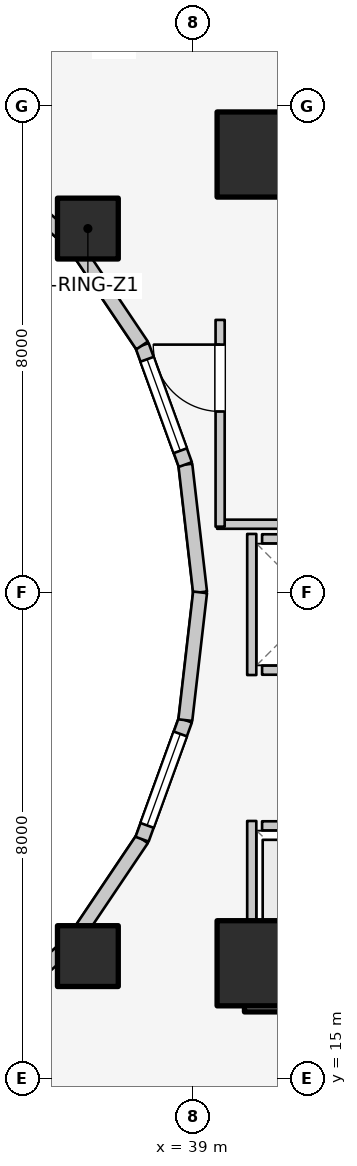
"""IFC4 building model, lengths in metres.
Left out: names, types, materials, properties, quantities, classifications, styles, units other than length and angle.
Written with IfcOpenShell. Run it as: python <this file> out.ifc"""

import sys

from ifc_helpers import new_model, si_unit, direction, frame, frame_2d, origin, origin_2d, place, context, subcontext, project, spatial, rectangle, extrude, element, fill, save


model = new_model("IFC4")
c1 = context("Model", 3, precision=1e-05, world=origin(), true_north=direction((0.0, 1.0)))
c2 = subcontext(c1, "Body", "Model", "MODEL_VIEW")
j1 = project(units=[si_unit("LENGTHUNIT", "METRE"), si_unit("PLANEANGLEUNIT", "RADIAN")], contexts=[c1])
p1 = place(None, origin())
s1 = spatial("IfcSite", under=j1, at=p1, CompositionType="ELEMENT")
p2 = place(p1, origin())
s2 = spatial("IfcBuilding", under=s1, at=p2, CompositionType="ELEMENT")
p3 = place(p2, frame((0.0, 0.0, 58.6)))
s3 = spatial("IfcBuildingStorey", under=s2, at=p3, CompositionType="ELEMENT", Elevation=58.6)
for number, where, z_axis, x_axis in (
    (1, (39.85, 16.55, 0.0), (0.0, 0.0, 1.0), (1.0, 0.0, 0.0)),
    (2, (39.85, 30.35, 0.0), (0.0, 0.0, 1.0), (1.0, 0.0, 0.0)),
):
    element("IfcWall", number, at=place(p3, frame(where, z_axis=z_axis, x_axis=x_axis)), inside=s3, PredefinedType="SHEAR", context=c2, shape_type="SweptSolid", body=[
        extrude(rectangle(XDim=4.5, YDim=0.9, at=frame_2d((2.25, 0.0))), origin(), (0.0, 0.0, 1.0), 3.1),
    ])
for number, where, z_axis, x_axis in (
    (3, (40.1, 16.9, 0.0), (0.0, 0.0, 1.0), (1.0, 0.0, 0.0)),
    (4, (40.1, 30.2, 0.0), (0.0, 0.0, 1.0), (1.0, 0.0, 0.0)),
):
    element("IfcColumn", number, at=place(p3, frame(where, z_axis=z_axis, x_axis=x_axis)), inside=s3, PredefinedType="COLUMN", context=c2, shape_type="SweptSolid", body=[
        extrude(rectangle(XDim=1.4, YDim=1.4, at=origin_2d()), origin(), (0.0, 0.0, 1.0), 3.1),
    ])
for number, where, z_axis, x_axis in (
    (5, (37.275, 28.982, 0.0), (0.0, 0.0, 1.0), (1.0, 0.0, 0.0)),
    (6, (37.275, 17.018, 0.0), (0.0, 0.0, 1.0), (1.0, 0.0, 0.0)),
):
    element("IfcColumn", number, at=place(p3, frame(where, z_axis=z_axis, x_axis=x_axis)), inside=s3, PredefinedType="COLUMN", context=c2, shape_type="SweptSolid", body=[
        extrude(rectangle(XDim=1.0, YDim=1.0, at=origin_2d()), origin(), (0.0, 0.0, 1.0), 3.1),
    ])
p4 = place(p3, frame((39.12, 23.0, 0.0), z_axis=(0.0, 0.0, 1.0), x_axis=(-0.114711713601, 0.993398823617, 0.0)))
e7 = element("IfcWall", 7, at=p4, inside=s3, PredefinedType="STANDARD", context=c2, shape_type="SweptSolid", body=[
    extrude(rectangle(XDim=2.115, YDim=0.23, at=frame_2d((1.058, 0.0))), origin(), (0.0, 0.0, 1.0), 2.84),
])
p5 = place(p3, frame((38.877, 25.102, 0.0), z_axis=(0.0, 0.0, 1.0), x_axis=(-0.341423187295, 0.93990968033, 0.0)))
e8 = element("IfcWall", 8, at=p5, inside=s3, PredefinedType="STANDARD", context=c2, shape_type="SweptSolid", body=[
    extrude(rectangle(XDim=2.084, YDim=0.23, at=frame_2d((1.042, 0.0))), origin(), (0.0, 0.0, 1.0), 2.84),
])
p6 = place(p5, frame((0.242, 0.0, 0.85)))
e9 = element("IfcOpeningElement", 9, at=p6, cuts=e8, PredefinedType="OPENING", context=c2, shape_type="SweptSolid", body=[
    extrude(rectangle(XDim=1.6, YDim=1.65, at=frame_2d((0.8, 0.825))), frame((0.0, 0.125, 0.0), z_axis=(0.0, -1.0, 0.0), x_axis=(1.0, 0.0, 0.0)), (0.0, 0.0, 1.0), 0.25),
])
p7 = place(p3, frame((38.166, 27.06, 0.0), z_axis=(0.0, 0.0, 1.0), x_axis=(-0.558197800898, 0.829707909492, 0.0)))
e10 = element("IfcWall", 10, at=p7, inside=s3, PredefinedType="STANDARD", context=c2, shape_type="SweptSolid", body=[
    extrude(rectangle(XDim=2.027, YDim=0.23, at=frame_2d((1.013, 0.0))), origin(), (0.0, 0.0, 1.0), 2.16),
])
for number, where, z_axis, x_axis in (
    (11, (37.035, 28.742, 0.0), (0.0, 0.0, 1.0), (-0.753, 0.659, 0.0)),
    (12, (35.56, 15.968, 0.0), (0.0, 0.0, 1.0), (0.753, 0.659, 0.0)),
):
    element("IfcWall", number, at=place(p3, frame(where, z_axis=z_axis, x_axis=x_axis)), inside=s3, PredefinedType="STANDARD", context=c2, shape_type="SweptSolid", body=[
        extrude(rectangle(XDim=1.959, YDim=0.23, at=frame_2d((0.98, 0.0))), origin(), (0.0, 0.0, 1.0), 2.16),
    ])
p8 = place(p3, frame((37.035, 17.258, 0.0), z_axis=(0.0, 0.0, 1.0), x_axis=(0.558197800898, 0.829707909492, 0.0)))
e13 = element("IfcWall", 13, at=p8, inside=s3, PredefinedType="STANDARD", context=c2, shape_type="SweptSolid", body=[
    extrude(rectangle(XDim=2.027, YDim=0.23, at=frame_2d((1.013, 0.0))), origin(), (0.0, 0.0, 1.0), 2.16),
])
p9 = place(p3, frame((38.166, 18.94, 0.0), z_axis=(0.0, 0.0, 1.0), x_axis=(0.341423187295, 0.93990968033, 0.0)))
e14 = element("IfcWall", 14, at=p9, inside=s3, PredefinedType="STANDARD", context=c2, shape_type="SweptSolid", body=[
    extrude(rectangle(XDim=2.084, YDim=0.23, at=frame_2d((1.042, 0.0))), origin(), (0.0, 0.0, 1.0), 2.84),
])
p10 = place(p9, frame((0.242, 0.0, 0.85)))
e15 = element("IfcOpeningElement", 15, at=p10, cuts=e14, PredefinedType="OPENING", context=c2, shape_type="SweptSolid", body=[
    extrude(rectangle(XDim=1.6, YDim=1.65, at=frame_2d((0.8, 0.825))), frame((0.0, 0.125, 0.0), z_axis=(0.0, -1.0, 0.0), x_axis=(1.0, 0.0, 0.0)), (0.0, 0.0, 1.0), 0.25),
])
p11 = place(p3, frame((38.877, 20.898, 0.0), z_axis=(0.0, 0.0, 1.0), x_axis=(0.114711713601, 0.993398823617, 0.0)))
e16 = element("IfcWall", 16, at=p11, inside=s3, PredefinedType="STANDARD", context=c2, shape_type="SweptSolid", body=[
    extrude(rectangle(XDim=2.115, YDim=0.23, at=frame_2d((1.058, 0.0))), origin(), (0.0, 0.0, 1.0), 2.84),
])
p12 = place(p3, frame((40.14, 19.16, 0.0), z_axis=(0.0, 0.0, 1.0), x_axis=(1.0, 0.0, 0.0)))
e17 = element("IfcWall", 17, at=p12, inside=s3, PredefinedType="SOLIDWALL", context=c2, shape_type="SweptSolid", body=[
    extrude(rectangle(XDim=1.82, YDim=0.15, at=frame_2d((0.91, 0.0))), origin(), (0.0, 0.0, 1.0), 2.12),
])
p13 = place(p12, frame((0.36, 0.0, 0.0)))
e18 = element("IfcOpeningElement", 18, at=p13, cuts=e17, PredefinedType="OPENING", context=c2, shape_type="SweptSolid", body=[
    extrude(rectangle(XDim=1.1, YDim=2.1, at=frame_2d((0.55, 1.05))), frame((0.0, 0.085, 0.0), z_axis=(0.0, -1.0, 0.0), x_axis=(1.0, 0.0, 0.0)), (0.0, 0.0, 1.0), 0.17),
])
p14 = place(p3, frame((40.14, 17.1, 0.0), z_axis=(0.0, 0.0, 1.0), x_axis=(1.0, 0.0, 0.0)))
e19 = element("IfcWall", 19, at=p14, inside=s3, PredefinedType="SOLIDWALL", context=c2, shape_type="SweptSolid", body=[
    extrude(rectangle(XDim=1.82, YDim=0.15, at=frame_2d((0.91, 0.0))), origin(), (0.0, 0.0, 1.0), 2.12),
])
p15 = place(p3, frame((39.97, 17.02, 0.0), z_axis=(0.0, 0.0, 1.0), x_axis=(0.0, 1.0, 0.0)))
e20 = element("IfcWall", 20, at=p15, inside=s3, PredefinedType="SOLIDWALL", context=c2, shape_type="SweptSolid", body=[
    extrude(rectangle(XDim=2.22, YDim=0.15, at=frame_2d((1.11, 0.0))), origin(), (0.0, 0.0, 1.0), 2.12),
])
for number, where, z_axis, x_axis in (
    (21, (40.14, 21.72, 0.0), (0.0, 0.0, 1.0), (1.0, 0.0, 0.0)),
    (22, (40.14, 23.88, 0.0), (0.0, 0.0, 1.0), (1.0, 0.0, 0.0)),
):
    element("IfcWall", number, at=place(p3, frame(where, z_axis=z_axis, x_axis=x_axis)), inside=s3, PredefinedType="SOLIDWALL", context=c2, shape_type="SweptSolid", body=[
        extrude(rectangle(XDim=1.82, YDim=0.15, at=frame_2d((0.91, 0.0))), origin(), (0.0, 0.0, 1.0), 2.12),
    ])
p16 = place(p3, frame((39.97, 21.64, 0.0), z_axis=(0.0, 0.0, 1.0), x_axis=(0.0, 1.0, 0.0)))
e23 = element("IfcWall", 23, at=p16, inside=s3, PredefinedType="SOLIDWALL", context=c2, shape_type="SweptSolid", body=[
    extrude(rectangle(XDim=2.32, YDim=0.15, at=frame_2d((1.16, 0.0))), origin(), (0.0, 0.0, 1.0), 2.12),
])
p17 = place(p3, frame((39.4, 24.12, 0.0), z_axis=(0.0, 0.0, 1.0), x_axis=(1.0, 0.0, 0.0)))
e24 = element("IfcWall", 24, at=p17, inside=s3, PredefinedType="PARTITIONING", context=c2, shape_type="SweptSolid", body=[
    extrude(rectangle(XDim=5.08, YDim=0.15, at=frame_2d((2.54, 0.0))), origin(), (0.0, 0.0, 1.0), 2.12),
])
p18 = place(p3, frame((39.45, 24.08, 0.0), z_axis=(0.0, 0.0, 1.0), x_axis=(0.0, 1.0, 0.0)))
e25 = element("IfcWall", 25, at=p18, inside=s3, PredefinedType="PARTITIONING", context=c2, shape_type="SweptSolid", body=[
    extrude(rectangle(XDim=3.4, YDim=0.15, at=frame_2d((1.7, 0.0))), origin(), (0.0, 0.0, 1.0), 2.855),
])
p19 = place(p18, frame((1.894, 0.0, 0.0)))
e26 = element("IfcOpeningElement", 26, at=p19, cuts=e25, PredefinedType="OPENING", context=c2, shape_type="SweptSolid", body=[
    extrude(rectangle(XDim=1.1, YDim=2.1, at=frame_2d((0.55, 1.05))), frame((0.0, 0.085, 0.0), z_axis=(0.0, -1.0, 0.0), x_axis=(1.0, 0.0, 0.0)), (0.0, 0.0, 1.0), 0.17),
])
p20 = place(p6, origin())
e27 = element("IfcWindow", 27, at=p20, inside=s3, PartitioningType="SINGLE_PANEL", PredefinedType="WINDOW", context=c2, shape_type="SweptSolid", body=[
    extrude(rectangle(XDim=1.6, YDim=1.65, at=frame_2d((0.8, 0.825))), frame((0.0, 0.03, 0.0), z_axis=(0.0, -1.0, 0.0), x_axis=(1.0, 0.0, 0.0)), (0.0, 0.0, 1.0), 0.06),
])
fill(e9, e27)
p21 = place(p10, origin())
e28 = element("IfcWindow", 28, at=p21, inside=s3, PartitioningType="SINGLE_PANEL", PredefinedType="WINDOW", context=c2, shape_type="SweptSolid", body=[
    extrude(rectangle(XDim=1.6, YDim=1.65, at=frame_2d((0.8, 0.825))), frame((0.0, 0.03, 0.0), z_axis=(0.0, -1.0, 0.0), x_axis=(1.0, 0.0, 0.0)), (0.0, 0.0, 1.0), 0.06),
])
fill(e15, e28)
p22 = place(p19, origin())
e29 = element("IfcDoor", 29, at=p22, inside=s3, OperationType="SINGLE_SWING_RIGHT", PredefinedType="DOOR", context=c2, shape_type="SweptSolid", body=[
    extrude(rectangle(XDim=1.1, YDim=2.1, at=frame_2d((0.55, 1.05))), frame((0.0, 0.025, 0.0), z_axis=(0.0, -1.0, 0.0), x_axis=(1.0, 0.0, 0.0)), (0.0, 0.0, 1.0), 0.05),
])
fill(e26, e29)
save(model, sys.argv[1])
